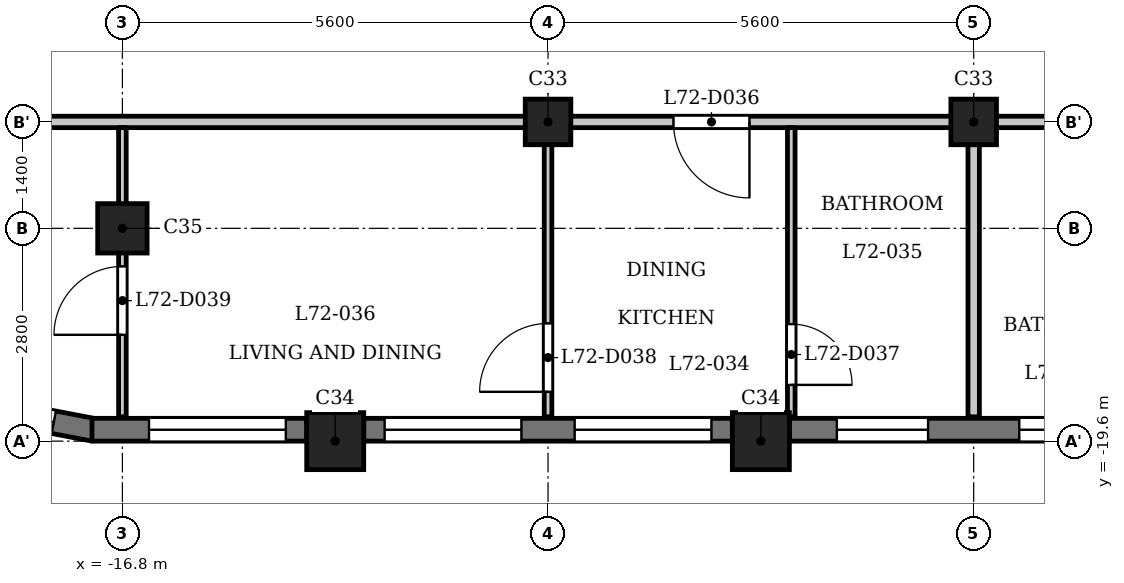
"""IFC4 building model, lengths in metres.
Left out: names, types, materials, properties, quantities, classifications, styles, units other than length and angle.
Written with IfcOpenShell. Run it as: python <this file> out.ifc"""

import sys

from ifc_helpers import new_model, si_unit, direction, frame, frame_2d, origin, origin_2d, place, context, subcontext, project, spatial, rectangle, extrude, element, fill, save


model = new_model("IFC4")
c1 = context("Model", 3, precision=1e-05, world=origin(), true_north=direction((0.0, 1.0)))
c2 = subcontext(c1, "Body", "Model", "MODEL_VIEW")
j1 = project(units=[si_unit("LENGTHUNIT", "METRE"), si_unit("PLANEANGLEUNIT", "RADIAN")], contexts=[c1])
p1 = place(None, origin())
s1 = spatial("IfcSite", under=j1, at=p1, CompositionType="ELEMENT")
p2 = place(p1, origin())
s2 = spatial("IfcBuilding", under=s1, at=p2, CompositionType="ELEMENT")
p3 = place(p2, frame((0.0, 0.0, 276.7)))
s3 = spatial("IfcBuildingStorey", under=s2, at=p3, CompositionType="ELEMENT", Elevation=276.7)
for number, where, z_axis, x_axis in (
    (1, (-14.0, -19.6, 0.0), (0.0, 0.0, 1.0), (1.0, 0.0, 0.0)),
    (2, (-8.4, -19.6, 0.0), (0.0, 0.0, 1.0), (1.0, 0.0, 0.0)),
):
    element("IfcColumn", number, at=place(p3, frame(where, z_axis=z_axis, x_axis=x_axis)), inside=s3, PredefinedType="COLUMN", context=c2, shape_type="SweptSolid", body=[
        extrude(rectangle(XDim=0.75, YDim=0.75, at=origin_2d()), origin(), (0.0, 0.0, 1.0), 3.5),
    ])
p4 = place(p3, frame((-16.8, -16.8, 0.0), z_axis=(0.0, 0.0, 1.0), x_axis=(1.0, 0.0, 0.0)))
e3 = element("IfcColumn", 3, at=p4, inside=s3, PredefinedType="COLUMN", context=c2, shape_type="SweptSolid", body=[
    extrude(rectangle(XDim=0.65, YDim=0.65, at=origin_2d()), origin(), (0.0, 0.0, 1.0), 3.5),
])
for number, where, z_axis, x_axis in (
    (4, (-11.2, -15.4, 0.0), (0.0, 0.0, 1.0), (1.0, 0.0, 0.0)),
    (5, (-5.6, -15.4, 0.0), (0.0, 0.0, 1.0), (1.0, 0.0, 0.0)),
):
    element("IfcColumn", number, at=place(p3, frame(where, z_axis=z_axis, x_axis=x_axis)), inside=s3, PredefinedType="COLUMN", context=c2, shape_type="SweptSolid", body=[
        extrude(rectangle(XDim=0.6, YDim=0.6, at=origin_2d()), origin(), (0.0, 0.0, 1.0), 3.5),
    ])
p5 = place(p3, frame((-19.02, -19.1, 0.0), z_axis=(0.0, 0.0, 1.0), x_axis=(0.982284001233, -0.187398348234, 0.0)))
e6 = element("IfcWall", 6, at=p5, inside=s3, PredefinedType="SOLIDWALL", context=c2, shape_type="SweptSolid", body=[
    extrude(rectangle(XDim=1.881, YDim=0.3, at=frame_2d((0.941, 0.0))), origin(), (0.0, 0.0, 1.0), 2.55),
])
p6 = place(p5, frame((0.541, 0.0, 0.6)))
e7 = element("IfcOpeningElement", 7, at=p6, cuts=e6, PredefinedType="OPENING", context=c2, shape_type="SweptSolid", body=[
    extrude(rectangle(XDim=0.8, YDim=1.55, at=frame_2d((0.4, 0.775))), frame((0.0, 0.16, 0.0), z_axis=(0.0, -1.0, 0.0), x_axis=(1.0, 0.0, 0.0)), (0.0, 0.0, 1.0), 0.32),
])
p7 = place(p3, frame((-17.2, -19.45, 0.0), z_axis=(0.0, 0.0, 1.0), x_axis=(1.0, 0.0, 0.0)))
e8 = element("IfcWall", 8, at=p7, inside=s3, PredefinedType="SOLIDWALL", context=c2, shape_type="SweptSolid", body=[
    extrude(rectangle(XDim=2.825, YDim=0.3, at=frame_2d((1.413, 0.0))), origin(), (0.0, 0.0, 1.0), 2.55),
])
p8 = place(p7, frame((0.75, 0.0, 0.9)))
e9 = element("IfcOpeningElement", 9, at=p8, cuts=e8, PredefinedType="OPENING", context=c2, shape_type="SweptSolid", body=[
    extrude(rectangle(XDim=1.8, YDim=1.25, at=frame_2d((0.9, 0.625))), frame((0.0, 0.16, 0.0), z_axis=(0.0, -1.0, 0.0), x_axis=(1.0, 0.0, 0.0)), (0.0, 0.0, 1.0), 0.32),
])
p9 = place(p3, frame((-13.625, -19.45, 0.0), z_axis=(0.0, 0.0, 1.0), x_axis=(1.0, 0.0, 0.0)))
e10 = element("IfcWall", 10, at=p9, inside=s3, PredefinedType="SOLIDWALL", context=c2, shape_type="SweptSolid", body=[
    extrude(rectangle(XDim=4.85, YDim=0.3, at=frame_2d((2.425, 0.0))), origin(), (0.0, 0.0, 1.0), 2.55),
])
p10 = place(p9, frame((0.275, 0.0, 0.9)))
e11 = element("IfcOpeningElement", 11, at=p10, cuts=e10, PredefinedType="OPENING", context=c2, shape_type="SweptSolid", body=[
    extrude(rectangle(XDim=1.8, YDim=1.25, at=frame_2d((0.9, 0.625))), frame((0.0, 0.16, 0.0), z_axis=(0.0, -1.0, 0.0), x_axis=(1.0, 0.0, 0.0)), (0.0, 0.0, 1.0), 0.32),
])
p11 = place(p9, frame((2.775, 0.0, 0.9)))
e12 = element("IfcOpeningElement", 12, at=p11, cuts=e10, PredefinedType="OPENING", context=c2, shape_type="SweptSolid", body=[
    extrude(rectangle(XDim=1.8, YDim=1.25, at=frame_2d((0.9, 0.625))), frame((0.0, 0.16, 0.0), z_axis=(0.0, -1.0, 0.0), x_axis=(1.0, 0.0, 0.0)), (0.0, 0.0, 1.0), 0.32),
])
p12 = place(p3, frame((-8.025, -19.45, 0.0), z_axis=(0.0, 0.0, 1.0), x_axis=(1.0, 0.0, 0.0)))
e13 = element("IfcWall", 13, at=p12, inside=s3, PredefinedType="SOLIDWALL", context=c2, shape_type="SweptSolid", body=[
    extrude(rectangle(XDim=4.85, YDim=0.3, at=frame_2d((2.425, 0.0))), origin(), (0.0, 0.0, 1.0), 2.55),
])
p13 = place(p12, frame((0.625, 0.0, 0.6)))
e14 = element("IfcOpeningElement", 14, at=p13, cuts=e13, PredefinedType="OPENING", context=c2, shape_type="SweptSolid", body=[
    extrude(rectangle(XDim=1.2, YDim=1.55, at=frame_2d((0.6, 0.775))), frame((0.0, 0.16, 0.0), z_axis=(0.0, -1.0, 0.0), x_axis=(1.0, 0.0, 0.0)), (0.0, 0.0, 1.0), 0.32),
])
p14 = place(p12, frame((3.025, 0.0, 0.6)))
e15 = element("IfcOpeningElement", 15, at=p14, cuts=e13, PredefinedType="OPENING", context=c2, shape_type="SweptSolid", body=[
    extrude(rectangle(XDim=1.2, YDim=1.55, at=frame_2d((0.6, 0.775))), frame((0.0, 0.16, 0.0), z_axis=(0.0, -1.0, 0.0), x_axis=(1.0, 0.0, 0.0)), (0.0, 0.0, 1.0), 0.32),
])
p15 = place(p3, frame((-23.322, -15.4, 0.0), z_axis=(0.0, 0.0, 1.0), x_axis=(1.0, 0.0, 0.0)))
e16 = element("IfcWall", 16, at=p15, inside=s3, PredefinedType="PARTITIONING", context=c2, shape_type="SweptSolid", body=[
    extrude(rectangle(XDim=46.872, YDim=0.15, at=frame_2d((23.436, 0.0))), origin(), (0.0, 0.0, 1.0), 3.2),
])
p16 = place(p15, frame((13.772, 0.0, 0.0)))
e17 = element("IfcOpeningElement", 17, at=p16, cuts=e16, PredefinedType="OPENING", context=c2, shape_type="SweptSolid", body=[
    extrude(rectangle(XDim=1.0, YDim=2.1, at=frame_2d((0.5, 1.05))), frame((0.0, 0.085, 0.0), z_axis=(0.0, -1.0, 0.0), x_axis=(1.0, 0.0, 0.0)), (0.0, 0.0, 1.0), 0.17),
])
p17 = place(p15, frame((21.772, 0.0, 0.0)))
e18 = element("IfcOpeningElement", 18, at=p17, cuts=e16, PredefinedType="OPENING", context=c2, shape_type="SweptSolid", body=[
    extrude(rectangle(XDim=1.0, YDim=2.1, at=frame_2d((0.5, 1.05))), frame((0.0, 0.085, 0.0), z_axis=(0.0, -1.0, 0.0), x_axis=(1.0, 0.0, 0.0)), (0.0, 0.0, 1.0), 0.17),
])
p18 = place(p15, frame((31.972, 0.0, 0.0)))
e19 = element("IfcOpeningElement", 19, at=p18, cuts=e16, PredefinedType="OPENING", context=c2, shape_type="SweptSolid", body=[
    extrude(rectangle(XDim=1.0, YDim=2.1, at=frame_2d((0.5, 1.05))), frame((0.0, 0.085, 0.0), z_axis=(0.0, -1.0, 0.0), x_axis=(1.0, 0.0, 0.0)), (0.0, 0.0, 1.0), 0.17),
])
p19 = place(p3, frame((-16.8, -19.28, 0.0), z_axis=(0.0, 0.0, 1.0), x_axis=(0.0, 1.0, 0.0)))
e20 = element("IfcWall", 20, at=p19, inside=s3, PredefinedType="PARTITIONING", context=c2, shape_type="SweptSolid", body=[
    extrude(rectangle(XDim=3.805, YDim=0.1, at=frame_2d((1.902, 0.0))), origin(), (0.0, 0.0, 1.0), 3.2),
])
p20 = place(p19, frame((1.079, 0.0, 0.0)))
e21 = element("IfcOpeningElement", 21, at=p20, cuts=e20, PredefinedType="OPENING", context=c2, shape_type="SweptSolid", body=[
    extrude(rectangle(XDim=0.9, YDim=2.1, at=frame_2d((0.45, 1.05))), frame((0.0, 0.06, 0.0), z_axis=(0.0, -1.0, 0.0), x_axis=(1.0, 0.0, 0.0)), (0.0, 0.0, 1.0), 0.12),
])
p21 = place(p3, frame((-11.2, -19.28, 0.0), z_axis=(0.0, 0.0, 1.0), x_axis=(0.0, 1.0, 0.0)))
e22 = element("IfcWall", 22, at=p21, inside=s3, PredefinedType="PARTITIONING", context=c2, shape_type="SweptSolid", body=[
    extrude(rectangle(XDim=3.805, YDim=0.1, at=frame_2d((1.902, 0.0))), origin(), (0.0, 0.0, 1.0), 3.2),
])
p22 = place(p21, frame((0.329, 0.0, 0.0)))
e23 = element("IfcOpeningElement", 23, at=p22, cuts=e22, PredefinedType="OPENING", context=c2, shape_type="SweptSolid", body=[
    extrude(rectangle(XDim=0.9, YDim=2.1, at=frame_2d((0.45, 1.05))), frame((0.0, 0.06, 0.0), z_axis=(0.0, -1.0, 0.0), x_axis=(1.0, 0.0, 0.0)), (0.0, 0.0, 1.0), 0.12),
])
p23 = place(p3, frame((-8.0, -19.28, 0.0), z_axis=(0.0, 0.0, 1.0), x_axis=(0.0, 1.0, 0.0)))
e24 = element("IfcWall", 24, at=p23, inside=s3, PredefinedType="PARTITIONING", context=c2, shape_type="SweptSolid", body=[
    extrude(rectangle(XDim=3.805, YDim=0.1, at=frame_2d((1.902, 0.0))), origin(), (0.0, 0.0, 1.0), 3.2),
])
p24 = place(p23, frame((0.42, 0.0, 0.0)))
e25 = element("IfcOpeningElement", 25, at=p24, cuts=e24, PredefinedType="OPENING", context=c2, shape_type="SweptSolid", body=[
    extrude(rectangle(XDim=0.8, YDim=2.1, at=frame_2d((0.4, 1.05))), frame((0.0, 0.06, 0.0), z_axis=(0.0, -1.0, 0.0), x_axis=(1.0, 0.0, 0.0)), (0.0, 0.0, 1.0), 0.12),
])
p25 = place(p3, frame((-5.6, -19.28, 0.0), z_axis=(0.0, 0.0, 1.0), x_axis=(0.0, 1.0, 0.0)))
e26 = element("IfcWall", 26, at=p25, inside=s3, PredefinedType="PARTITIONING", context=c2, shape_type="SweptSolid", body=[
    extrude(rectangle(XDim=3.805, YDim=0.15, at=frame_2d((1.902, 0.0))), origin(), (0.0, 0.0, 1.0), 3.2),
])
p26 = place(p16, origin())
e27 = element("IfcDoor", 27, at=p26, inside=s3, OperationType="SINGLE_SWING_RIGHT", PredefinedType="DOOR", context=c2, shape_type="SweptSolid", body=[
    extrude(rectangle(XDim=1.0, YDim=2.1, at=frame_2d((0.5, 1.05))), frame((0.0, 0.025, 0.0), z_axis=(0.0, -1.0, 0.0), x_axis=(1.0, 0.0, 0.0)), (0.0, 0.0, 1.0), 0.05),
])
fill(e17, e27)
p27 = place(p24, origin())
e28 = element("IfcDoor", 28, at=p27, inside=s3, OperationType="SINGLE_SWING_LEFT", PredefinedType="DOOR", context=c2, shape_type="SweptSolid", body=[
    extrude(rectangle(XDim=0.8, YDim=2.1, at=frame_2d((0.4, 1.05))), frame((0.0, 0.025, 0.0), z_axis=(0.0, -1.0, 0.0), x_axis=(1.0, 0.0, 0.0)), (0.0, 0.0, 1.0), 0.05),
])
fill(e25, e28)
p28 = place(p22, origin())
e29 = element("IfcDoor", 29, at=p28, inside=s3, OperationType="SINGLE_SWING_RIGHT", PredefinedType="DOOR", context=c2, shape_type="SweptSolid", body=[
    extrude(rectangle(XDim=0.9, YDim=2.1, at=frame_2d((0.45, 1.05))), frame((0.0, 0.025, 0.0), z_axis=(0.0, -1.0, 0.0), x_axis=(1.0, 0.0, 0.0)), (0.0, 0.0, 1.0), 0.05),
])
fill(e23, e29)
p29 = place(p20, origin())
e30 = element("IfcDoor", 30, at=p29, inside=s3, OperationType="SINGLE_SWING_RIGHT", PredefinedType="DOOR", context=c2, shape_type="SweptSolid", body=[
    extrude(rectangle(XDim=0.9, YDim=2.1, at=frame_2d((0.45, 1.05))), frame((0.0, 0.025, 0.0), z_axis=(0.0, -1.0, 0.0), x_axis=(1.0, 0.0, 0.0)), (0.0, 0.0, 1.0), 0.05),
])
fill(e21, e30)
p30 = place(p6, origin())
e31 = element("IfcWindow", 31, at=p30, inside=s3, PartitioningType="SINGLE_PANEL", PredefinedType="WINDOW", context=c2, shape_type="SweptSolid", body=[
    extrude(rectangle(XDim=0.8, YDim=1.55, at=frame_2d((0.4, 0.775))), frame((0.0, 0.03, 0.0), z_axis=(0.0, -1.0, 0.0), x_axis=(1.0, 0.0, 0.0)), (0.0, 0.0, 1.0), 0.06),
])
fill(e7, e31)
p31 = place(p8, origin())
e32 = element("IfcWindow", 32, at=p31, inside=s3, PartitioningType="SINGLE_PANEL", PredefinedType="WINDOW", context=c2, shape_type="SweptSolid", body=[
    extrude(rectangle(XDim=1.8, YDim=1.25, at=frame_2d((0.9, 0.625))), frame((0.0, 0.03, 0.0), z_axis=(0.0, -1.0, 0.0), x_axis=(1.0, 0.0, 0.0)), (0.0, 0.0, 1.0), 0.06),
])
fill(e9, e32)
p32 = place(p10, origin())
e33 = element("IfcWindow", 33, at=p32, inside=s3, PartitioningType="SINGLE_PANEL", PredefinedType="WINDOW", context=c2, shape_type="SweptSolid", body=[
    extrude(rectangle(XDim=1.8, YDim=1.25, at=frame_2d((0.9, 0.625))), frame((0.0, 0.03, 0.0), z_axis=(0.0, -1.0, 0.0), x_axis=(1.0, 0.0, 0.0)), (0.0, 0.0, 1.0), 0.06),
])
fill(e11, e33)
p33 = place(p11, origin())
e34 = element("IfcWindow", 34, at=p33, inside=s3, PartitioningType="SINGLE_PANEL", PredefinedType="WINDOW", context=c2, shape_type="SweptSolid", body=[
    extrude(rectangle(XDim=1.8, YDim=1.25, at=frame_2d((0.9, 0.625))), frame((0.0, 0.03, 0.0), z_axis=(0.0, -1.0, 0.0), x_axis=(1.0, 0.0, 0.0)), (0.0, 0.0, 1.0), 0.06),
])
fill(e12, e34)
p34 = place(p13, origin())
e35 = element("IfcWindow", 35, at=p34, inside=s3, PartitioningType="SINGLE_PANEL", PredefinedType="WINDOW", context=c2, shape_type="SweptSolid", body=[
    extrude(rectangle(XDim=1.2, YDim=1.55, at=frame_2d((0.6, 0.775))), frame((0.0, 0.03, 0.0), z_axis=(0.0, -1.0, 0.0), x_axis=(1.0, 0.0, 0.0)), (0.0, 0.0, 1.0), 0.06),
])
fill(e14, e35)
p35 = place(p14, origin())
e36 = element("IfcWindow", 36, at=p35, inside=s3, PartitioningType="SINGLE_PANEL", PredefinedType="WINDOW", context=c2, shape_type="SweptSolid", body=[
    extrude(rectangle(XDim=1.2, YDim=1.55, at=frame_2d((0.6, 0.775))), frame((0.0, 0.03, 0.0), z_axis=(0.0, -1.0, 0.0), x_axis=(1.0, 0.0, 0.0)), (0.0, 0.0, 1.0), 0.06),
])
fill(e15, e36)
save(model, sys.argv[1])
